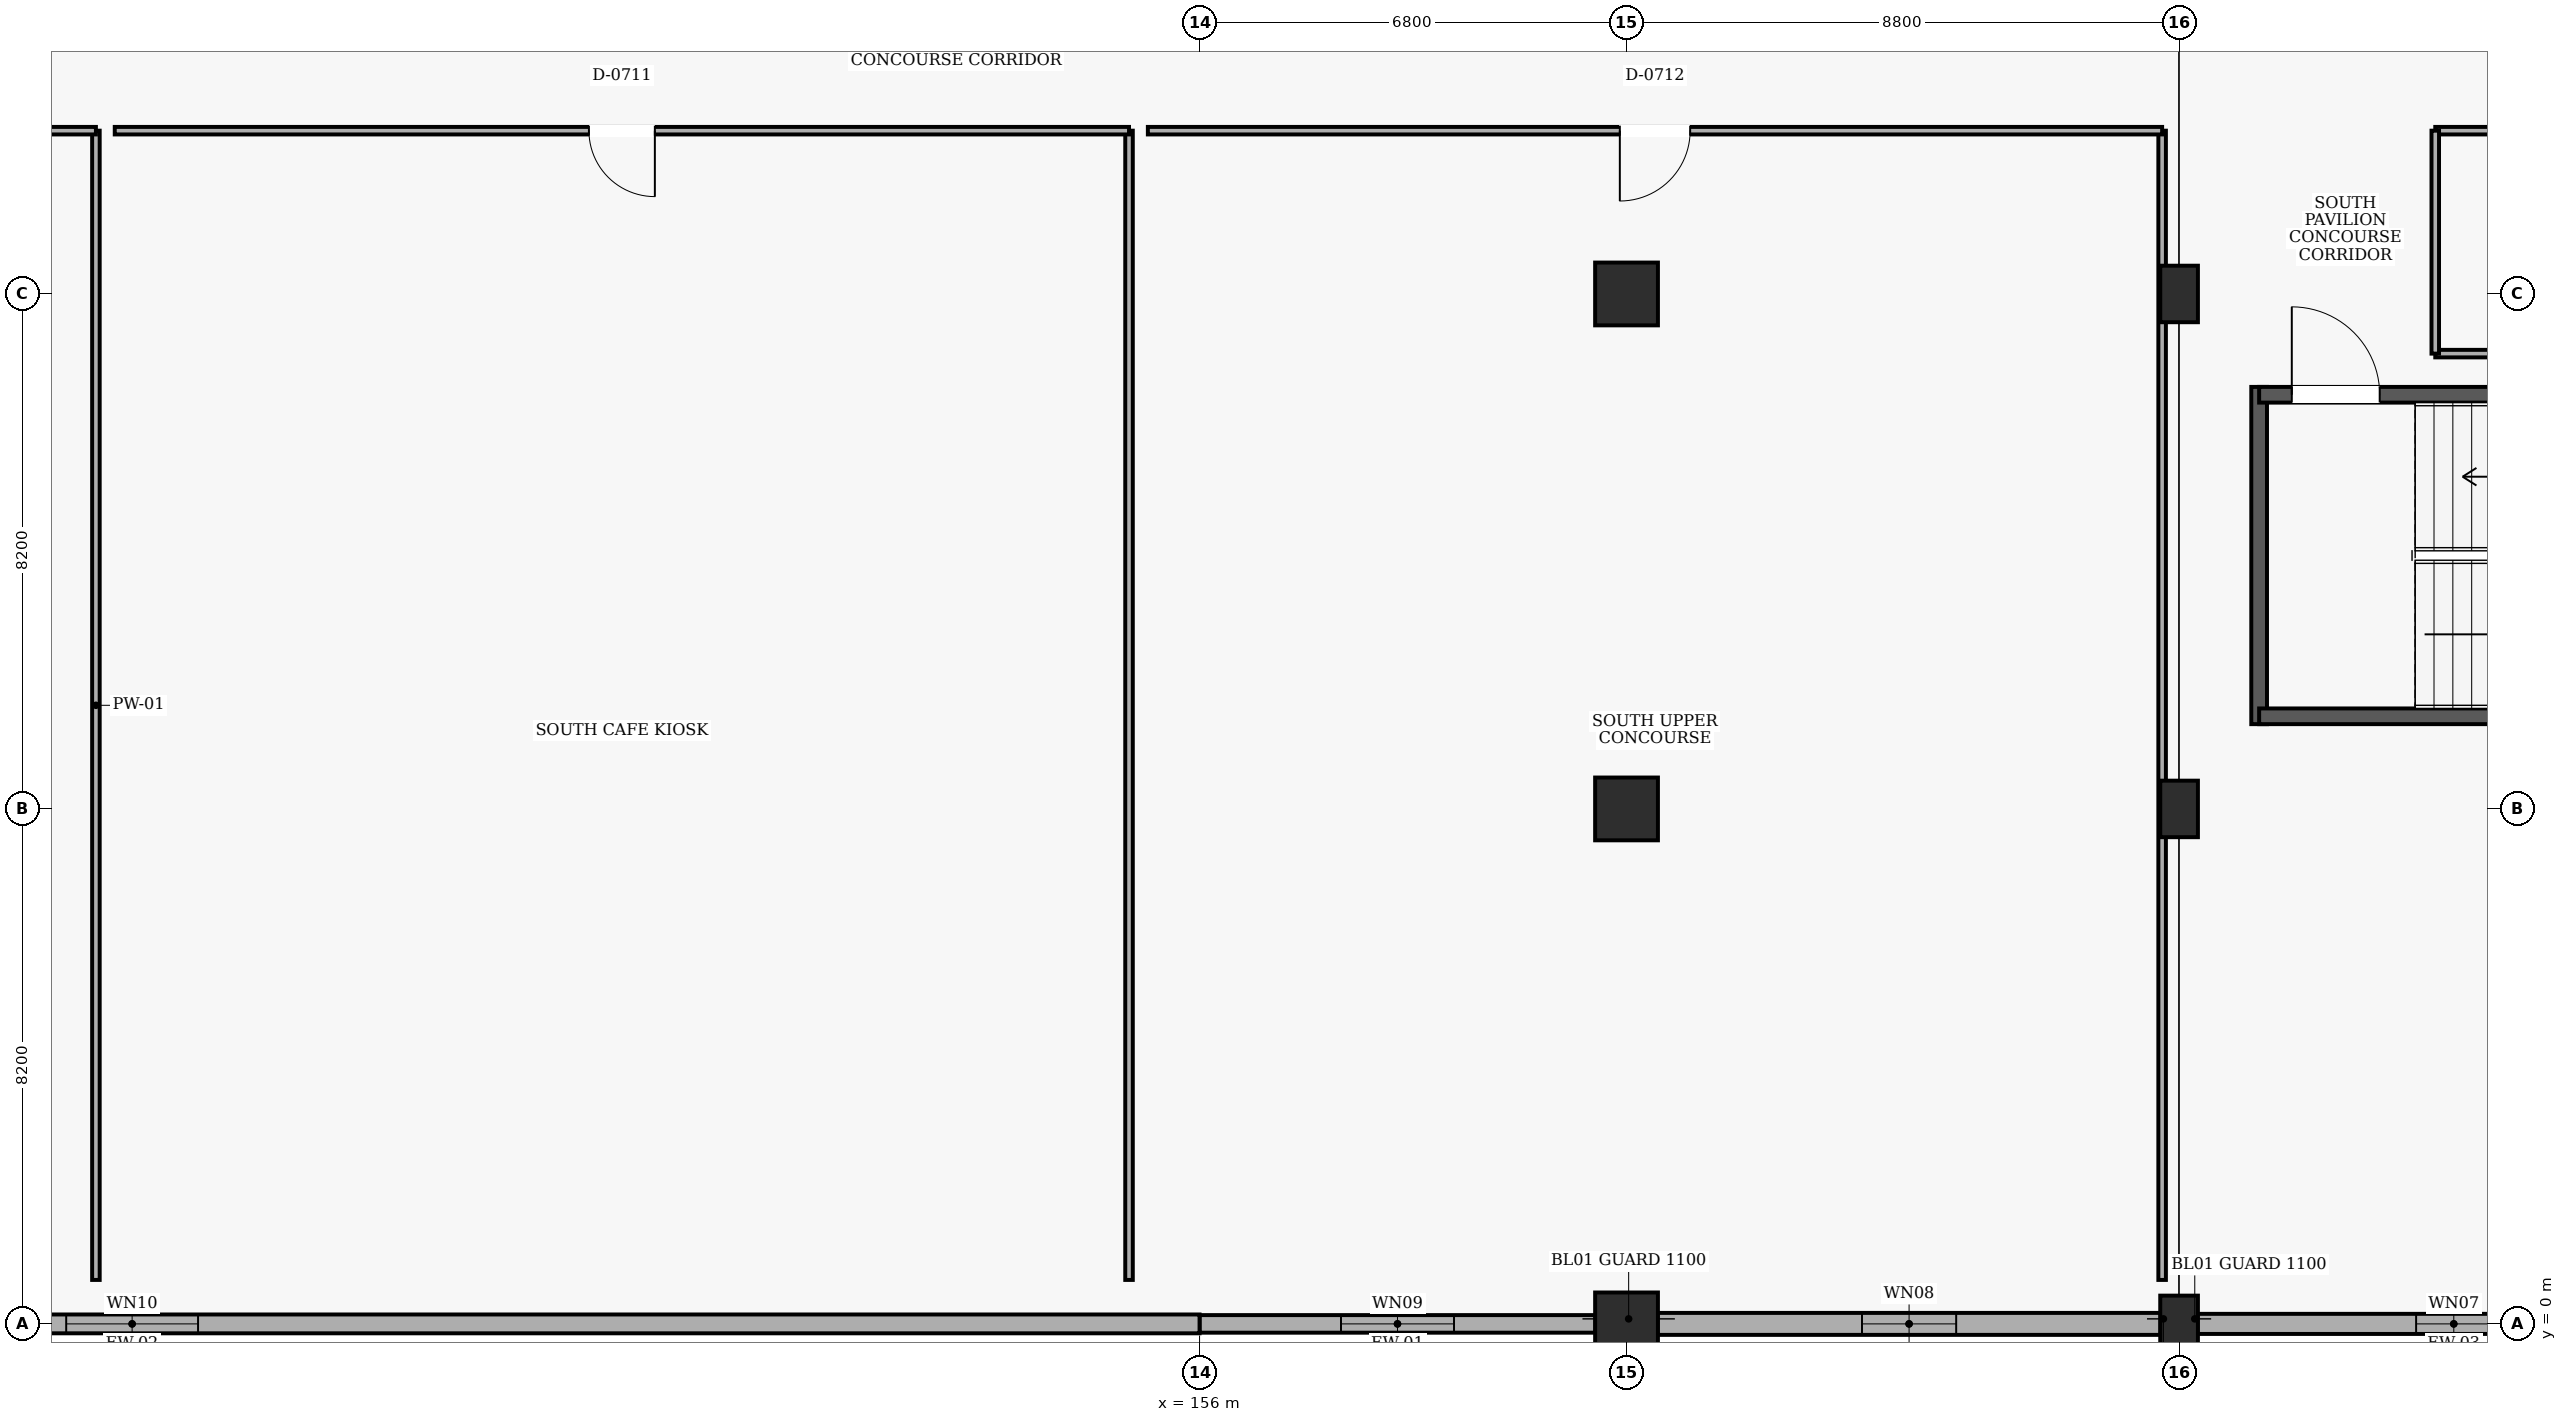
"""IFC4 building model, lengths in metres.
Left out: names, types, materials, properties, quantities, classifications, styles, units other than length and angle.
Written with IfcOpenShell. Run it as: python <this file> out.ifc"""

import sys

from ifc_helpers import new_model, si_unit, direction, frame, frame_2d, origin, origin_2d, place, context, subcontext, project, spatial, rectangle, extrude, element, fill, save


model = new_model("IFC4")
c1 = context("Model", 3, precision=1e-05, world=origin(), true_north=direction((0.0, 1.0)))
c2 = subcontext(c1, "Body", "Model", "MODEL_VIEW")
j1 = project(units=[si_unit("LENGTHUNIT", "METRE"), si_unit("PLANEANGLEUNIT", "RADIAN")], contexts=[c1])
p1 = place(None, origin())
s1 = spatial("IfcSite", under=j1, at=p1, CompositionType="ELEMENT")
p2 = place(p1, origin())
s2 = spatial("IfcBuilding", under=s1, at=p2, CompositionType="ELEMENT")
p3 = place(p2, frame((0.0, 0.0, 15.0)))
s3 = spatial("IfcBuildingStorey", under=s2, at=p3, CompositionType="ELEMENT", Elevation=15.0)
for number, where, z_axis, x_axis in (
    (1, (162.8, 0.0, 0.0), (0.0, 0.0, 1.0), (1.0, 0.0, 0.0)),
    (2, (162.8, 8.2, 0.0), (0.0, 0.0, 1.0), (1.0, 0.0, 0.0)),
    (3, (162.8, 16.4, 0.0), (0.0, 0.0, 1.0), (1.0, 0.0, 0.0)),
):
    element("IfcColumn", number, at=place(p3, frame(where, z_axis=z_axis, x_axis=x_axis)), inside=s3, PredefinedType="COLUMN", context=c2, shape_type="SweptSolid", body=[
        extrude(rectangle(XDim=1.0, YDim=1.0, at=origin_2d()), origin(), (0.0, 0.0, 1.0), 4.8),
    ])
for number, where, z_axis, x_axis in (
    (4, (171.6, 0.0, 0.0), (0.0, 0.0, 1.0), (1.0, 0.0, 0.0)),
    (5, (171.6, 8.2, 0.0), (0.0, 0.0, 1.0), (1.0, 0.0, 0.0)),
    (6, (171.6, 16.4, 0.0), (0.0, 0.0, 1.0), (1.0, 0.0, 0.0)),
):
    element("IfcColumn", number, at=place(p3, frame(where, z_axis=z_axis, x_axis=x_axis)), inside=s3, PredefinedType="COLUMN", context=c2, shape_type="SweptSolid", body=[
        extrude(rectangle(XDim=0.6, YDim=0.9, at=origin_2d()), origin(), (0.0, 0.0, 1.0), 4.8),
    ])
p4 = place(p3, frame((180.055, 0.0, 0.0), z_axis=(0.0, 0.0, 1.0), x_axis=(-1.0, 0.0, 0.0)))
e7 = element("IfcWall", 7, at=p4, inside=s3, PredefinedType="SOLIDWALL", context=c2, shape_type="SweptSolid", body=[
    extrude(rectangle(XDim=8.16, YDim=0.32, at=frame_2d((4.08, 0.0))), origin(), (0.0, 0.0, 1.0), 3.78),
])
p5 = place(p4, frame((3.48, 0.0, 0.9)))
e8 = element("IfcOpeningElement", 8, at=p5, cuts=e7, PredefinedType="OPENING", context=c2, shape_type="SweptSolid", body=[
    extrude(rectangle(XDim=1.2, YDim=1.8, at=frame_2d((0.6, 0.9))), frame((0.0, 0.17, 0.0), z_axis=(0.0, -1.0, 0.0), x_axis=(1.0, 0.0, 0.0)), (0.0, 0.0, 1.0), 0.34),
])
p6 = place(p3, frame((171.305, 0.0, 0.0), z_axis=(0.0, 0.0, 1.0), x_axis=(-1.0, 0.0, 0.0)))
e9 = element("IfcWall", 9, at=p6, inside=s3, PredefinedType="SOLIDWALL", context=c2, shape_type="SweptSolid", body=[
    extrude(rectangle(XDim=8.01, YDim=0.35, at=frame_2d((4.005, 0.0))), origin(), (0.0, 0.0, 1.0), 3.78),
])
p7 = place(p6, frame((3.255, 0.0, 0.9)))
e10 = element("IfcOpeningElement", 10, at=p7, cuts=e9, PredefinedType="OPENING", context=c2, shape_type="SweptSolid", body=[
    extrude(rectangle(XDim=1.5, YDim=1.8, at=frame_2d((0.75, 0.9))), frame((0.0, 0.185, 0.0), z_axis=(0.0, -1.0, 0.0), x_axis=(1.0, 0.0, 0.0)), (0.0, 0.0, 1.0), 0.37),
])
p8 = place(p3, frame((162.305, 0.0, 0.0), z_axis=(0.0, 0.0, 1.0), x_axis=(-1.0, 0.0, 0.0)))
e11 = element("IfcWall", 11, at=p8, inside=s3, PredefinedType="SOLIDWALL", context=c2, shape_type="SweptSolid", body=[
    extrude(rectangle(XDim=6.305, YDim=0.28, at=frame_2d((3.152, 0.0))), origin(), (0.0, 0.0, 1.0), 4.48),
])
p9 = place(p8, frame((2.252, 0.0, 0.9)))
e12 = element("IfcOpeningElement", 12, at=p9, cuts=e11, PredefinedType="OPENING", context=c2, shape_type="SweptSolid", body=[
    extrude(rectangle(XDim=1.8, YDim=1.8, at=frame_2d((0.9, 0.9))), frame((0.0, 0.15, 0.0), z_axis=(0.0, -1.0, 0.0), x_axis=(1.0, 0.0, 0.0)), (0.0, 0.0, 1.0), 0.3),
])
p10 = place(p3, frame((156.0, 0.0, 0.0), z_axis=(0.0, 0.0, 1.0), x_axis=(-1.0, 0.0, 0.0)))
e13 = element("IfcWall", 13, at=p10, inside=s3, PredefinedType="SOLIDWALL", context=c2, shape_type="SweptSolid", body=[
    extrude(rectangle(XDim=34.0, YDim=0.3, at=frame_2d((17.0, 0.0))), origin(), (0.0, 0.0, 1.0), 4.48),
])
p11 = place(p10, frame((15.95, 0.0, 0.9)))
e14 = element("IfcOpeningElement", 14, at=p11, cuts=e13, PredefinedType="OPENING", context=c2, shape_type="SweptSolid", body=[
    extrude(rectangle(XDim=2.1, YDim=1.8, at=frame_2d((1.05, 0.9))), frame((0.0, 0.16, 0.0), z_axis=(0.0, -1.0, 0.0), x_axis=(1.0, 0.0, 0.0)), (0.0, 0.0, 1.0), 0.32),
])
p12 = place(p3, frame((172.875, 14.92, 0.0), z_axis=(0.0, 0.0, 1.0), x_axis=(0.0, -1.0, 0.0)))
e15 = element("IfcWall", 15, at=p12, inside=s3, PredefinedType="SHEAR", context=c2, shape_type="SweptSolid", body=[
    extrude(rectangle(XDim=5.37, YDim=0.25, at=frame_2d((2.685, 0.0))), origin(), (0.0, 0.0, 1.0), 4.5),
])
p13 = place(p3, frame((172.875, 14.795, 0.0), z_axis=(0.0, 0.0, 1.0), x_axis=(1.0, 0.0, 0.0)))
e16 = element("IfcWall", 16, at=p13, inside=s3, PredefinedType="SHEAR", context=c2, shape_type="SweptSolid", body=[
    extrude(rectangle(XDim=10.85, YDim=0.25, at=frame_2d((5.425, 0.0))), origin(), (0.0, 0.0, 1.0), 4.5),
])
p14 = place(p13, frame((0.52, 0.0, 0.0)))
e17 = element("IfcOpeningElement", 17, at=p14, cuts=e16, PredefinedType="OPENING", context=c2, shape_type="SweptSolid", body=[
    extrude(rectangle(XDim=1.4, YDim=2.15, at=frame_2d((0.7, 1.075))), frame((0.0, 0.135, 0.0), z_axis=(0.0, -1.0, 0.0), x_axis=(1.0, 0.0, 0.0)), (0.0, 0.0, 1.0), 0.27),
])
p15 = place(p3, frame((172.875, 9.675, 0.0), z_axis=(0.0, 0.0, 1.0), x_axis=(1.0, 0.0, 0.0)))
e18 = element("IfcWall", 18, at=p15, inside=s3, PredefinedType="SHEAR", context=c2, shape_type="SweptSolid", body=[
    extrude(rectangle(XDim=10.85, YDim=0.25, at=frame_2d((5.425, 0.0))), origin(), (0.0, 0.0, 1.0), 4.5),
])
p16 = place(p3, frame((138.423, 0.7, 0.0), z_axis=(0.0, 0.0, 1.0), x_axis=(0.0, 1.0, 0.0)))
e19 = element("IfcWall", 19, at=p16, inside=s3, PredefinedType="PARTITIONING", context=c2, shape_type="SweptSolid", body=[
    extrude(rectangle(XDim=18.3, YDim=0.12, at=frame_2d((9.15, 0.0))), origin(), (0.0, 0.0, 1.0), 4.5),
])
p17 = place(p3, frame((138.423, 19.0, 0.0), z_axis=(0.0, 0.0, 1.0), x_axis=(-1.0, 0.0, 0.0)))
e20 = element("IfcWall", 20, at=p17, inside=s3, PredefinedType="PARTITIONING", context=c2, shape_type="SweptSolid", body=[
    extrude(rectangle(XDim=16.153, YDim=0.12, at=frame_2d((8.077, 0.0))), origin(), (0.0, 0.0, 1.0), 4.5),
])
p18 = place(p17, frame((7.577, 0.0, 0.0)))
e21 = element("IfcOpeningElement", 21, at=p18, cuts=e20, PredefinedType="OPENING", context=c2, shape_type="SweptSolid", body=[
    extrude(rectangle(XDim=1.0, YDim=2.1, at=frame_2d((0.5, 1.05))), frame((0.0, 0.07, 0.0), z_axis=(0.0, -1.0, 0.0), x_axis=(1.0, 0.0, 0.0)), (0.0, 0.0, 1.0), 0.14),
])
p19 = place(p3, frame((154.877, 0.7, 0.0), z_axis=(0.0, 0.0, 1.0), x_axis=(0.0, 1.0, 0.0)))
e22 = element("IfcWall", 22, at=p19, inside=s3, PredefinedType="PARTITIONING", context=c2, shape_type="SweptSolid", body=[
    extrude(rectangle(XDim=18.3, YDim=0.12, at=frame_2d((9.15, 0.0))), origin(), (0.0, 0.0, 1.0), 4.5),
])
p20 = place(p3, frame((154.877, 19.0, 0.0), z_axis=(0.0, 0.0, 1.0), x_axis=(-1.0, 0.0, 0.0)))
e23 = element("IfcWall", 23, at=p20, inside=s3, PredefinedType="PARTITIONING", context=c2, shape_type="SweptSolid", body=[
    extrude(rectangle(XDim=16.153, YDim=0.12, at=frame_2d((8.077, 0.0))), origin(), (0.0, 0.0, 1.0), 4.5),
])
p21 = place(p20, frame((7.552, 0.0, 0.0)))
e24 = element("IfcOpeningElement", 24, at=p21, cuts=e23, PredefinedType="OPENING", context=c2, shape_type="SweptSolid", body=[
    extrude(rectangle(XDim=1.05, YDim=2.15, at=frame_2d((0.525, 1.075))), frame((0.0, 0.07, 0.0), z_axis=(0.0, -1.0, 0.0), x_axis=(1.0, 0.0, 0.0)), (0.0, 0.0, 1.0), 0.14),
])
p22 = place(p3, frame((171.33, 0.7, 0.0), z_axis=(0.0, 0.0, 1.0), x_axis=(0.0, 1.0, 0.0)))
e25 = element("IfcWall", 25, at=p22, inside=s3, PredefinedType="PARTITIONING", context=c2, shape_type="SweptSolid", body=[
    extrude(rectangle(XDim=18.3, YDim=0.12, at=frame_2d((9.15, 0.0))), origin(), (0.0, 0.0, 1.0), 3.78),
])
p23 = place(p3, frame((171.33, 19.0, 0.0), z_axis=(0.0, 0.0, 1.0), x_axis=(-1.0, 0.0, 0.0)))
e26 = element("IfcWall", 26, at=p23, inside=s3, PredefinedType="PARTITIONING", context=c2, shape_type="SweptSolid", body=[
    extrude(rectangle(XDim=16.153, YDim=0.12, at=frame_2d((8.077, 0.0))), origin(), (0.0, 0.0, 1.0), 4.5),
])
p24 = place(p23, frame((7.517, 0.0, 0.0)))
e27 = element("IfcOpeningElement", 27, at=p24, cuts=e26, PredefinedType="OPENING", context=c2, shape_type="SweptSolid", body=[
    extrude(rectangle(XDim=1.12, YDim=2.15, at=frame_2d((0.56, 1.075))), frame((0.0, 0.07, 0.0), z_axis=(0.0, -1.0, 0.0), x_axis=(1.0, 0.0, 0.0)), (0.0, 0.0, 1.0), 0.14),
])
p25 = place(p3, frame((175.68, 15.45, 0.0), z_axis=(0.0, 0.0, 1.0), x_axis=(1.0, 0.0, 0.0)))
e28 = element("IfcWall", 28, at=p25, inside=s3, PredefinedType="PARTITIONING", context=c2, shape_type="SweptSolid", body=[
    extrude(rectangle(XDim=6.14, YDim=0.12, at=frame_2d((3.07, 0.0))), origin(), (0.0, 0.0, 1.0), 4.5),
])
p26 = place(p3, frame((181.82, 19.0, 0.0), z_axis=(0.0, 0.0, 1.0), x_axis=(-1.0, 0.0, 0.0)))
e29 = element("IfcWall", 29, at=p26, inside=s3, PredefinedType="PARTITIONING", context=c2, shape_type="SweptSolid", body=[
    extrude(rectangle(XDim=6.14, YDim=0.12, at=frame_2d((3.07, 0.0))), origin(), (0.0, 0.0, 1.0), 4.5),
])
p27 = place(p26, frame((2.42, 0.0, 0.0)))
e30 = element("IfcOpeningElement", 30, at=p27, cuts=e29, PredefinedType="OPENING", context=c2, shape_type="SweptSolid", body=[
    extrude(rectangle(XDim=1.3, YDim=2.2, at=frame_2d((0.65, 1.1))), frame((0.0, 0.07, 0.0), z_axis=(0.0, -1.0, 0.0), x_axis=(1.0, 0.0, 0.0)), (0.0, 0.0, 1.0), 0.14),
])
p28 = place(p3, frame((175.68, 19.0, 0.0), z_axis=(0.0, 0.0, 1.0), x_axis=(0.0, -1.0, 0.0)))
e31 = element("IfcWall", 31, at=p28, inside=s3, PredefinedType="PARTITIONING", context=c2, shape_type="SweptSolid", body=[
    extrude(rectangle(XDim=3.55, YDim=0.12, at=frame_2d((1.775, 0.0))), origin(), (0.0, 0.0, 1.0), 4.5),
])
p29 = place(p5, origin())
e32 = element("IfcWindow", 32, at=p29, inside=s3, PartitioningType="SINGLE_PANEL", PredefinedType="WINDOW", context=c2, shape_type="SweptSolid", body=[
    extrude(rectangle(XDim=1.2, YDim=1.8, at=frame_2d((0.6, 0.9))), frame((0.0, 0.03, 0.0), z_axis=(0.0, -1.0, 0.0), x_axis=(1.0, 0.0, 0.0)), (0.0, 0.0, 1.0), 0.06),
])
fill(e8, e32)
p30 = place(p7, origin())
e33 = element("IfcWindow", 33, at=p30, inside=s3, PartitioningType="SINGLE_PANEL", PredefinedType="WINDOW", context=c2, shape_type="SweptSolid", body=[
    extrude(rectangle(XDim=1.5, YDim=1.8, at=frame_2d((0.75, 0.9))), frame((0.0, 0.03, 0.0), z_axis=(0.0, -1.0, 0.0), x_axis=(1.0, 0.0, 0.0)), (0.0, 0.0, 1.0), 0.06),
])
fill(e10, e33)
p31 = place(p9, origin())
e34 = element("IfcWindow", 34, at=p31, inside=s3, PartitioningType="SINGLE_PANEL", PredefinedType="WINDOW", context=c2, shape_type="SweptSolid", body=[
    extrude(rectangle(XDim=1.8, YDim=1.8, at=frame_2d((0.9, 0.9))), frame((0.0, 0.03, 0.0), z_axis=(0.0, -1.0, 0.0), x_axis=(1.0, 0.0, 0.0)), (0.0, 0.0, 1.0), 0.06),
])
fill(e12, e34)
p32 = place(p11, origin())
e35 = element("IfcWindow", 35, at=p32, inside=s3, PartitioningType="SINGLE_PANEL", PredefinedType="WINDOW", context=c2, shape_type="SweptSolid", body=[
    extrude(rectangle(XDim=2.1, YDim=1.8, at=frame_2d((1.05, 0.9))), frame((0.0, 0.03, 0.0), z_axis=(0.0, -1.0, 0.0), x_axis=(1.0, 0.0, 0.0)), (0.0, 0.0, 1.0), 0.06),
])
fill(e14, e35)
p33 = place(p14, frame((1.4, 0.0, 0.0), z_axis=(0.0, 0.0, 1.0), x_axis=(-1.0, 0.0, 0.0)))
e36 = element("IfcDoor", 36, at=p33, inside=s3, OperationType="SINGLE_SWING_RIGHT", PredefinedType="DOOR", context=c2, shape_type="SweptSolid", body=[
    extrude(rectangle(XDim=1.4, YDim=2.15, at=frame_2d((0.7, 1.075))), frame((0.0, 0.025, 0.0), z_axis=(0.0, -1.0, 0.0), x_axis=(1.0, 0.0, 0.0)), (0.0, 0.0, 1.0), 0.05),
])
fill(e17, e36)
p34 = place(p21, origin())
e37 = element("IfcDoor", 37, at=p34, inside=s3, OperationType="SINGLE_SWING_LEFT", PredefinedType="DOOR", context=c2, shape_type="SweptSolid", body=[
    extrude(rectangle(XDim=1.05, YDim=2.15, at=frame_2d((0.525, 1.075))), frame((0.0, 0.025, 0.0), z_axis=(0.0, -1.0, 0.0), x_axis=(1.0, 0.0, 0.0)), (0.0, 0.0, 1.0), 0.05),
])
fill(e24, e37)
p35 = place(p24, origin())
e38 = element("IfcDoor", 38, at=p35, inside=s3, OperationType="SINGLE_SWING_RIGHT", PredefinedType="DOOR", context=c2, shape_type="SweptSolid", body=[
    extrude(rectangle(XDim=1.12, YDim=2.15, at=frame_2d((0.56, 1.075))), frame((0.0, 0.025, 0.0), z_axis=(0.0, -1.0, 0.0), x_axis=(1.0, 0.0, 0.0)), (0.0, 0.0, 1.0), 0.05),
])
fill(e27, e38)
save(model, sys.argv[1])
